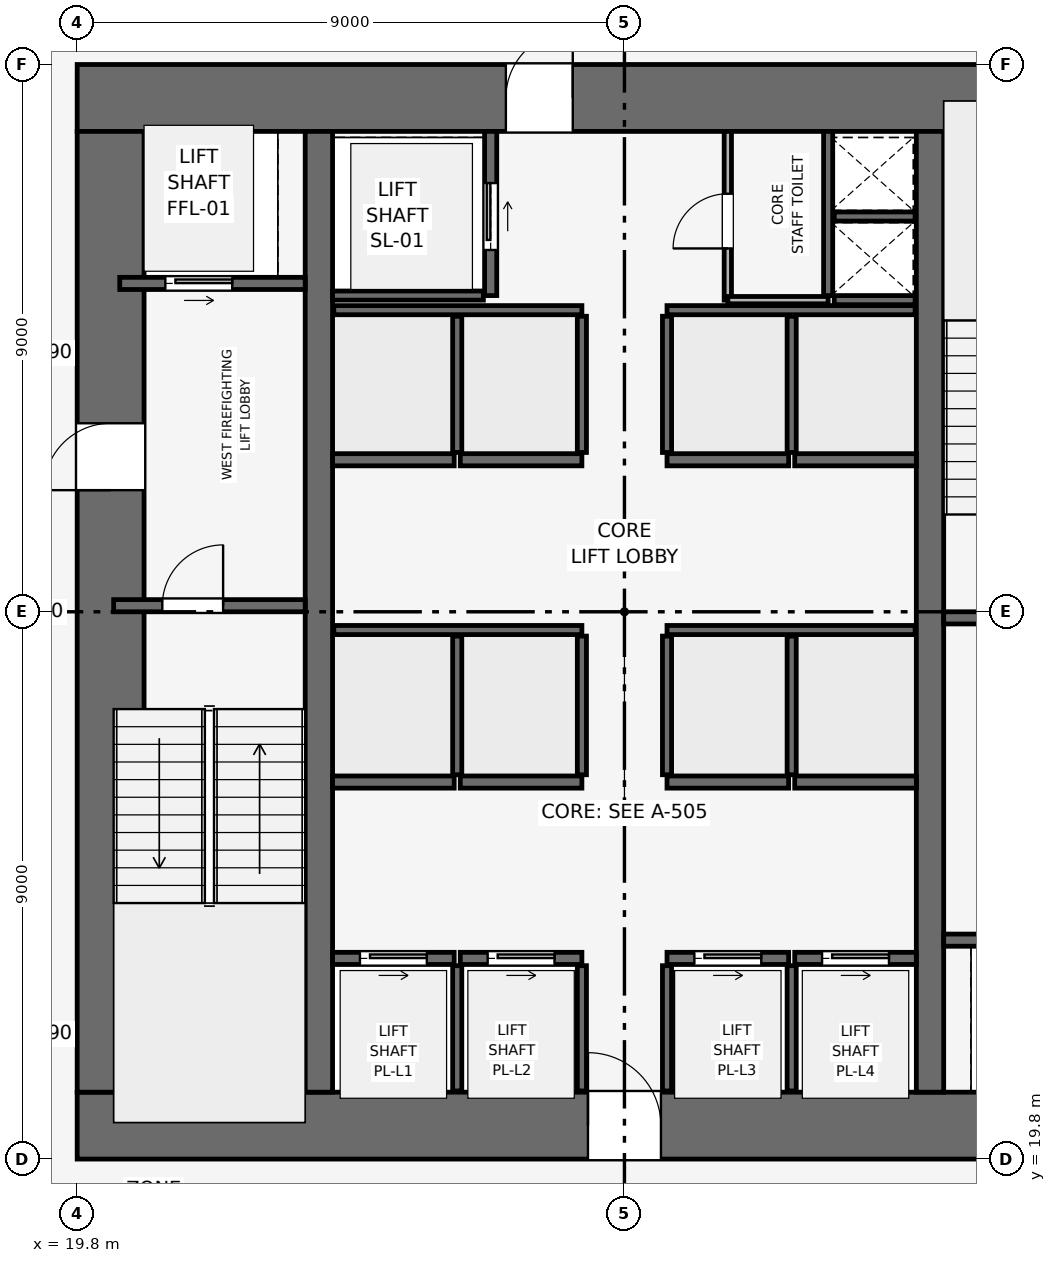
"""IFC4 building model, lengths in metres.
Left out: names, types, materials, properties, quantities, classifications, styles, units other than length and angle.
Written with IfcOpenShell. Run it as: python <this file> out.ifc"""

import sys

from ifc_helpers import new_model, si_unit, direction, frame, frame_2d, origin, place, context, subcontext, project, spatial, rectangle, extrude, element, fill, save


model = new_model("IFC4")
c1 = context("Model", 3, precision=1e-05, world=origin(), true_north=direction((0.0, 1.0)))
c2 = subcontext(c1, "Body", "Model", "MODEL_VIEW")
j1 = project(units=[si_unit("LENGTHUNIT", "METRE"), si_unit("PLANEANGLEUNIT", "RADIAN")], contexts=[c1])
p1 = place(None, origin())
s1 = spatial("IfcSite", under=j1, at=p1, CompositionType="ELEMENT")
p2 = place(p1, origin())
s2 = spatial("IfcBuilding", under=s1, at=p2, CompositionType="ELEMENT")
p3 = place(p2, frame((0.0, 0.0, 88.5)))
s3 = spatial("IfcBuildingStorey", under=s2, at=p3, CompositionType="ELEMENT", Elevation=88.5)
p4 = place(p3, frame((19.8, 20.35, 0.0), z_axis=(0.0, 0.0, 1.0), x_axis=(1.0, 0.0, 0.0)))
e1 = element("IfcWall", 1, at=p4, inside=s3, PredefinedType="SHEAR", context=c2, shape_type="SweptSolid", body=[
    extrude(rectangle(XDim=18.0, YDim=1.1, at=frame_2d((9.0, 0.0))), origin(), (0.0, 0.0, 1.0), 3.9),
])
p5 = place(p4, frame((8.4, 0.0, 0.0)))
e2 = element("IfcOpeningElement", 2, at=p5, cuts=e1, PredefinedType="OPENING", context=c2, shape_type="SweptSolid", body=[
    extrude(rectangle(XDim=1.2, YDim=2.2, at=frame_2d((0.6, 1.1))), frame((0.0, 0.56, 0.0), z_axis=(0.0, -1.0, 0.0), x_axis=(1.0, 0.0, 0.0)), (0.0, 0.0, 1.0), 1.12),
])
p6 = place(p3, frame((19.8, 37.25, 0.0), z_axis=(0.0, 0.0, 1.0), x_axis=(1.0, 0.0, 0.0)))
e3 = element("IfcWall", 3, at=p6, inside=s3, PredefinedType="SHEAR", context=c2, shape_type="SweptSolid", body=[
    extrude(rectangle(XDim=18.0, YDim=1.1, at=frame_2d((9.0, 0.0))), origin(), (0.0, 0.0, 1.0), 3.9),
])
p7 = place(p6, frame((7.05, 0.0, 0.0)))
e4 = element("IfcOpeningElement", 4, at=p7, cuts=e3, PredefinedType="OPENING", context=c2, shape_type="SweptSolid", body=[
    extrude(rectangle(XDim=1.1, YDim=2.15, at=frame_2d((0.55, 1.075))), frame((0.0, 0.56, 0.0), z_axis=(0.0, -1.0, 0.0), x_axis=(1.0, 0.0, 0.0)), (0.0, 0.0, 1.0), 1.12),
])
p8 = place(p3, frame((20.35, 20.9, 0.0), z_axis=(0.0, 0.0, 1.0), x_axis=(0.0, 1.0, 0.0)))
e5 = element("IfcWall", 5, at=p8, inside=s3, PredefinedType="SHEAR", context=c2, shape_type="SweptSolid", body=[
    extrude(rectangle(XDim=15.8, YDim=1.1, at=frame_2d((7.9, 0.0))), origin(), (0.0, 0.0, 1.0), 3.9),
])
p9 = place(p8, frame((9.9, 0.0, 0.0)))
e6 = element("IfcOpeningElement", 6, at=p9, cuts=e5, PredefinedType="OPENING", context=c2, shape_type="SweptSolid", body=[
    extrude(rectangle(XDim=1.1, YDim=2.15, at=frame_2d((0.55, 1.075))), frame((0.0, 0.56, 0.0), z_axis=(0.0, -1.0, 0.0), x_axis=(1.0, 0.0, 0.0)), (0.0, 0.0, 1.0), 1.12),
])
for number, where, z_axis, x_axis in (
    (7, (23.775, 20.9, 0.0), (0.0, 0.0, 1.0), (0.0, 1.0, 0.0)),
    (8, (33.825, 20.9, 0.0), (0.0, 0.0, 1.0), (0.0, 1.0, 0.0)),
):
    element("IfcWall", number, at=place(p3, frame(where, z_axis=z_axis, x_axis=x_axis)), inside=s3, PredefinedType="SHEAR", context=c2, shape_type="SweptSolid", body=[
        extrude(rectangle(XDim=15.8, YDim=0.45, at=frame_2d((7.9, 0.0))), origin(), (0.0, 0.0, 1.0), 3.9),
    ])
p10 = place(p3, frame((20.4, 28.9, 0.0), z_axis=(0.0, 0.0, 1.0), x_axis=(1.0, 0.0, 0.0)))
e9 = element("IfcWall", 9, at=p10, inside=s3, PredefinedType="SHEAR", context=c2, shape_type="SweptSolid", body=[
    extrude(rectangle(XDim=3.15, YDim=0.2, at=frame_2d((1.575, 0.0))), origin(), (0.0, 0.0, 1.0), 3.65),
])
p11 = place(p10, frame((0.8, 0.0, 0.0)))
e10 = element("IfcOpeningElement", 10, at=p11, cuts=e9, PredefinedType="OPENING", context=c2, shape_type="SweptSolid", body=[
    extrude(rectangle(XDim=1.0, YDim=2.1, at=frame_2d((0.5, 1.05))), frame((0.0, 0.11, 0.0), z_axis=(0.0, -1.0, 0.0), x_axis=(1.0, 0.0, 0.0)), (0.0, 0.0, 1.0), 0.22),
])
p12 = place(p3, frame((34.05, 28.7, 0.0), z_axis=(0.0, 0.0, 1.0), x_axis=(1.0, 0.0, 0.0)))
e11 = element("IfcWall", 11, at=p12, inside=s3, PredefinedType="SHEAR", context=c2, shape_type="SweptSolid", body=[
    extrude(rectangle(XDim=3.15, YDim=0.2, at=frame_2d((1.575, 0.0))), origin(), (0.0, 0.0, 1.0), 3.65),
])
p13 = place(p12, frame((0.8, 0.0, 0.0)))
e12 = element("IfcOpeningElement", 12, at=p13, cuts=e11, PredefinedType="OPENING", context=c2, shape_type="SweptSolid", body=[
    extrude(rectangle(XDim=1.0, YDim=2.1, at=frame_2d((0.5, 1.05))), frame((0.0, 0.11, 0.0), z_axis=(0.0, -1.0, 0.0), x_axis=(1.0, 0.0, 0.0)), (0.0, 0.0, 1.0), 0.22),
])
p14 = place(p3, frame((32.15, 34.0, 0.0), z_axis=(0.0, 0.0, 1.0), x_axis=(0.0, 1.0, 0.0)))
e13 = element("IfcWall", 13, at=p14, inside=s3, PredefinedType="SHEAR", context=c2, shape_type="SweptSolid", body=[
    extrude(rectangle(XDim=2.7, YDim=0.15, at=frame_2d((1.35, 0.0))), origin(), (0.0, 0.0, 1.0), 3.65),
])
for number, where, z_axis, x_axis in (
    (14, (32.25, 33.925, 0.0), (0.0, 0.0, 1.0), (1.0, 0.0, 0.0)),
    (15, (32.25, 35.3, 0.0), (0.0, 0.0, 1.0), (1.0, 0.0, 0.0)),
):
    element("IfcWall", number, at=place(p3, frame(where, z_axis=z_axis, x_axis=x_axis)), inside=s3, PredefinedType="SHEAR", context=c2, shape_type="SweptSolid", body=[
        extrude(rectangle(XDim=1.33, YDim=0.15, at=frame_2d((0.665, 0.0))), origin(), (0.0, 0.0, 1.0), 3.65),
    ])
p15 = place(p3, frame((20.5, 34.2, 0.0), z_axis=(0.0, 0.0, 1.0), x_axis=(1.0, 0.0, 0.0)))
e16 = element("IfcWall", 16, at=p15, inside=s3, PredefinedType="SHEAR", context=c2, shape_type="SweptSolid", body=[
    extrude(rectangle(XDim=3.05, YDim=0.2, at=frame_2d((1.525, 0.0))), origin(), (0.0, 0.0, 1.0), 3.65),
])
p16 = place(p15, frame((0.75, 0.0, 0.0)))
e17 = element("IfcOpeningElement", 17, at=p16, cuts=e16, PredefinedType="OPENING", context=c2, shape_type="SweptSolid", body=[
    extrude(rectangle(XDim=1.1, YDim=2.15, at=frame_2d((0.55, 1.075))), frame((0.0, 0.11, 0.0), z_axis=(0.0, -1.0, 0.0), x_axis=(1.0, 0.0, 0.0)), (0.0, 0.0, 1.0), 0.22),
])
p17 = place(p3, frame((34.05, 23.4, 0.0), z_axis=(0.0, 0.0, 1.0), x_axis=(1.0, 0.0, 0.0)))
e18 = element("IfcWall", 18, at=p17, inside=s3, PredefinedType="SHEAR", context=c2, shape_type="SweptSolid", body=[
    extrude(rectangle(XDim=3.05, YDim=0.2, at=frame_2d((1.525, 0.0))), origin(), (0.0, 0.0, 1.0), 3.65),
])
p18 = place(p17, frame((1.2, 0.0, 0.0)))
e19 = element("IfcOpeningElement", 19, at=p18, cuts=e18, PredefinedType="OPENING", context=c2, shape_type="SweptSolid", body=[
    extrude(rectangle(XDim=1.1, YDim=2.15, at=frame_2d((0.55, 1.075))), frame((0.0, 0.11, 0.0), z_axis=(0.0, -1.0, 0.0), x_axis=(1.0, 0.0, 0.0)), (0.0, 0.0, 1.0), 0.22),
])
p19 = place(p3, frame((26.6, 34.0, 0.0), z_axis=(0.0, 0.0, 1.0), x_axis=(0.0, 1.0, 0.0)))
e20 = element("IfcWall", 20, at=p19, inside=s3, PredefinedType="SHEAR", context=c2, shape_type="SweptSolid", body=[
    extrude(rectangle(XDim=2.7, YDim=0.2, at=frame_2d((1.35, 0.0))), origin(), (0.0, 0.0, 1.0), 3.65),
])
p20 = place(p19, frame((0.75, 0.0, 0.0)))
e21 = element("IfcOpeningElement", 21, at=p20, cuts=e20, PredefinedType="OPENING", context=c2, shape_type="SweptSolid", body=[
    extrude(rectangle(XDim=1.1, YDim=2.15, at=frame_2d((0.55, 1.075))), frame((0.0, 0.11, 0.0), z_axis=(0.0, -1.0, 0.0), x_axis=(1.0, 0.0, 0.0)), (0.0, 0.0, 1.0), 0.22),
])
p21 = place(p3, frame((24.0, 34.0, 0.0), z_axis=(0.0, 0.0, 1.0), x_axis=(1.0, 0.0, 0.0)))
e22 = element("IfcWall", 22, at=p21, inside=s3, PredefinedType="SHEAR", context=c2, shape_type="SweptSolid", body=[
    extrude(rectangle(XDim=2.48, YDim=0.15, at=frame_2d((1.24, 0.0))), origin(), (0.0, 0.0, 1.0), 3.65),
])
p22 = place(p3, frame((24.0, 23.1, 0.0), z_axis=(0.0, 0.0, 1.0), x_axis=(1.0, 0.0, 0.0)))
e23 = element("IfcWall", 23, at=p22, inside=s3, PredefinedType="SHEAR", context=c2, shape_type="SweptSolid", body=[
    extrude(rectangle(XDim=2.0, YDim=0.2, at=frame_2d((1.0, 0.0))), origin(), (0.0, 0.0, 1.0), 3.65),
])
p23 = place(p22, frame((0.45, 0.0, 0.0)))
e24 = element("IfcOpeningElement", 24, at=p23, cuts=e23, PredefinedType="OPENING", context=c2, shape_type="SweptSolid", body=[
    extrude(rectangle(XDim=1.1, YDim=2.15, at=frame_2d((0.55, 1.075))), frame((0.0, 0.11, 0.0), z_axis=(0.0, -1.0, 0.0), x_axis=(1.0, 0.0, 0.0)), (0.0, 0.0, 1.0), 0.22),
])
p24 = place(p3, frame((26.1, 23.1, 0.0), z_axis=(0.0, 0.0, 1.0), x_axis=(1.0, 0.0, 0.0)))
e25 = element("IfcWall", 25, at=p24, inside=s3, PredefinedType="SHEAR", context=c2, shape_type="SweptSolid", body=[
    extrude(rectangle(XDim=2.0, YDim=0.2, at=frame_2d((1.0, 0.0))), origin(), (0.0, 0.0, 1.0), 3.65),
])
p25 = place(p24, frame((0.45, 0.0, 0.0)))
e26 = element("IfcOpeningElement", 26, at=p25, cuts=e25, PredefinedType="OPENING", context=c2, shape_type="SweptSolid", body=[
    extrude(rectangle(XDim=1.1, YDim=2.15, at=frame_2d((0.55, 1.075))), frame((0.0, 0.11, 0.0), z_axis=(0.0, -1.0, 0.0), x_axis=(1.0, 0.0, 0.0)), (0.0, 0.0, 1.0), 0.22),
])
p26 = place(p3, frame((29.5, 23.1, 0.0), z_axis=(0.0, 0.0, 1.0), x_axis=(1.0, 0.0, 0.0)))
e27 = element("IfcWall", 27, at=p26, inside=s3, PredefinedType="SHEAR", context=c2, shape_type="SweptSolid", body=[
    extrude(rectangle(XDim=2.0, YDim=0.2, at=frame_2d((1.0, 0.0))), origin(), (0.0, 0.0, 1.0), 3.65),
])
p27 = place(p26, frame((0.45, 0.0, 0.0)))
e28 = element("IfcOpeningElement", 28, at=p27, cuts=e27, PredefinedType="OPENING", context=c2, shape_type="SweptSolid", body=[
    extrude(rectangle(XDim=1.1, YDim=2.15, at=frame_2d((0.55, 1.075))), frame((0.0, 0.11, 0.0), z_axis=(0.0, -1.0, 0.0), x_axis=(1.0, 0.0, 0.0)), (0.0, 0.0, 1.0), 0.22),
])
p28 = place(p3, frame((31.6, 23.1, 0.0), z_axis=(0.0, 0.0, 1.0), x_axis=(1.0, 0.0, 0.0)))
e29 = element("IfcWall", 29, at=p28, inside=s3, PredefinedType="SHEAR", context=c2, shape_type="SweptSolid", body=[
    extrude(rectangle(XDim=2.0, YDim=0.2, at=frame_2d((1.0, 0.0))), origin(), (0.0, 0.0, 1.0), 3.65),
])
p29 = place(p28, frame((0.45, 0.0, 0.0)))
e30 = element("IfcOpeningElement", 30, at=p29, cuts=e29, PredefinedType="OPENING", context=c2, shape_type="SweptSolid", body=[
    extrude(rectangle(XDim=1.1, YDim=2.15, at=frame_2d((0.55, 1.075))), frame((0.0, 0.11, 0.0), z_axis=(0.0, -1.0, 0.0), x_axis=(1.0, 0.0, 0.0)), (0.0, 0.0, 1.0), 0.22),
])
for number, where, z_axis, x_axis in (
    (31, (24.0, 26.0, 0.0), (0.0, 0.0, 1.0), (1.0, 0.0, 0.0)),
    (32, (26.1, 26.0, 0.0), (0.0, 0.0, 1.0), (1.0, 0.0, 0.0)),
    (33, (29.5, 26.0, 0.0), (0.0, 0.0, 1.0), (1.0, 0.0, 0.0)),
    (34, (31.6, 26.0, 0.0), (0.0, 0.0, 1.0), (1.0, 0.0, 0.0)),
    (35, (24.0, 31.3, 0.0), (0.0, 0.0, 1.0), (1.0, 0.0, 0.0)),
    (36, (26.1, 31.3, 0.0), (0.0, 0.0, 1.0), (1.0, 0.0, 0.0)),
    (37, (29.5, 31.3, 0.0), (0.0, 0.0, 1.0), (1.0, 0.0, 0.0)),
    (38, (31.6, 31.3, 0.0), (0.0, 0.0, 1.0), (1.0, 0.0, 0.0)),
):
    element("IfcWall", number, at=place(p3, frame(where, z_axis=z_axis, x_axis=x_axis)), inside=s3, PredefinedType="SHEAR", context=c2, shape_type="SweptSolid", body=[
        extrude(rectangle(XDim=2.0, YDim=0.2, at=frame_2d((1.0, 0.0))), origin(), (0.0, 0.0, 1.0), 3.65),
    ])
for number, where, z_axis, x_axis in (
    (39, (26.05, 20.92, 0.0), (0.0, 0.0, 1.0), (0.0, 1.0, 0.0)),
    (40, (28.1, 20.92, 0.0), (0.0, 0.0, 1.0), (0.0, 1.0, 0.0)),
    (41, (29.5, 20.92, 0.0), (0.0, 0.0, 1.0), (0.0, 1.0, 0.0)),
    (42, (31.55, 20.92, 0.0), (0.0, 0.0, 1.0), (0.0, 1.0, 0.0)),
):
    element("IfcWall", number, at=place(p3, frame(where, z_axis=z_axis, x_axis=x_axis)), inside=s3, PredefinedType="SHEAR", context=c2, shape_type="SweptSolid", body=[
        extrude(rectangle(XDim=2.06, YDim=0.15, at=frame_2d((1.03, 0.0))), origin(), (0.0, 0.0, 1.0), 3.65),
    ])
for number, where, z_axis, x_axis in (
    (43, (24.02, 28.5, 0.0), (0.0, 0.0, 1.0), (1.0, 0.0, 0.0)),
    (44, (29.5, 28.5, 0.0), (0.0, 0.0, 1.0), (1.0, 0.0, 0.0)),
):
    element("IfcWall", number, at=place(p3, frame(where, z_axis=z_axis, x_axis=x_axis)), inside=s3, PredefinedType="SHEAR", context=c2, shape_type="SweptSolid", body=[
        extrude(rectangle(XDim=4.08, YDim=0.15, at=frame_2d((2.04, 0.0))), origin(), (0.0, 0.0, 1.0), 3.65),
    ])
for number, where, z_axis, x_axis in (
    (45, (26.05, 26.12, 0.0), (0.0, 0.0, 1.0), (0.0, 1.0, 0.0)),
    (46, (28.1, 26.12, 0.0), (0.0, 0.0, 1.0), (0.0, 1.0, 0.0)),
    (47, (29.5, 26.12, 0.0), (0.0, 0.0, 1.0), (0.0, 1.0, 0.0)),
    (48, (31.55, 26.12, 0.0), (0.0, 0.0, 1.0), (0.0, 1.0, 0.0)),
):
    element("IfcWall", number, at=place(p3, frame(where, z_axis=z_axis, x_axis=x_axis)), inside=s3, PredefinedType="SHEAR", context=c2, shape_type="SweptSolid", body=[
        extrude(rectangle(XDim=2.28, YDim=0.15, at=frame_2d((1.14, 0.0))), origin(), (0.0, 0.0, 1.0), 3.65),
    ])
for number, where, z_axis, x_axis in (
    (49, (24.02, 33.76, 0.0), (0.0, 0.0, 1.0), (1.0, 0.0, 0.0)),
    (50, (29.5, 33.76, 0.0), (0.0, 0.0, 1.0), (1.0, 0.0, 0.0)),
):
    element("IfcWall", number, at=place(p3, frame(where, z_axis=z_axis, x_axis=x_axis)), inside=s3, PredefinedType="SHEAR", context=c2, shape_type="SweptSolid", body=[
        extrude(rectangle(XDim=4.08, YDim=0.15, at=frame_2d((2.04, 0.0))), origin(), (0.0, 0.0, 1.0), 3.65),
    ])
for number, where, z_axis, x_axis in (
    (51, (26.05, 31.42, 0.0), (0.0, 0.0, 1.0), (0.0, 1.0, 0.0)),
    (52, (28.1, 31.42, 0.0), (0.0, 0.0, 1.0), (0.0, 1.0, 0.0)),
    (53, (29.5, 31.42, 0.0), (0.0, 0.0, 1.0), (0.0, 1.0, 0.0)),
    (54, (31.55, 31.42, 0.0), (0.0, 0.0, 1.0), (0.0, 1.0, 0.0)),
):
    element("IfcWall", number, at=place(p3, frame(where, z_axis=z_axis, x_axis=x_axis)), inside=s3, PredefinedType="SHEAR", context=c2, shape_type="SweptSolid", body=[
        extrude(rectangle(XDim=2.24, YDim=0.15, at=frame_2d((1.12, 0.0))), origin(), (0.0, 0.0, 1.0), 3.65),
    ])
p30 = place(p3, frame((30.5, 33.925, 0.0), z_axis=(0.0, 0.0, 1.0), x_axis=(0.0, 1.0, 0.0)))
e55 = element("IfcWall", 55, at=p30, inside=s3, PredefinedType="PARTITIONING", context=c2, shape_type="SweptSolid", body=[
    extrude(rectangle(XDim=2.775, YDim=0.12, at=frame_2d((1.387, 0.0))), origin(), (0.0, 0.0, 1.0), 3.65),
])
p31 = place(p30, frame((0.85, 0.0, 0.0)))
e56 = element("IfcOpeningElement", 56, at=p31, cuts=e55, PredefinedType="OPENING", context=c2, shape_type="SweptSolid", body=[
    extrude(rectangle(XDim=0.9, YDim=2.1, at=frame_2d((0.45, 1.05))), frame((0.0, 0.07, 0.0), z_axis=(0.0, -1.0, 0.0), x_axis=(1.0, 0.0, 0.0)), (0.0, 0.0, 1.0), 0.14),
])
p32 = place(p3, frame((30.5, 33.925, 0.0), z_axis=(0.0, 0.0, 1.0), x_axis=(1.0, 0.0, 0.0)))
e57 = element("IfcWall", 57, at=p32, inside=s3, PredefinedType="PARTITIONING", context=c2, shape_type="SweptSolid", body=[
    extrude(rectangle(XDim=1.65, YDim=0.12, at=frame_2d((0.825, 0.0))), origin(), (0.0, 0.0, 1.0), 3.65),
])
p33 = place(p11, origin())
e58 = element("IfcDoor", 58, at=p33, inside=s3, OperationType="SINGLE_SWING_RIGHT", PredefinedType="DOOR", context=c2, shape_type="SweptSolid", body=[
    extrude(rectangle(XDim=1.0, YDim=2.1, at=frame_2d((0.5, 1.05))), frame((0.0, 0.025, 0.0), z_axis=(0.0, -1.0, 0.0), x_axis=(1.0, 0.0, 0.0)), (0.0, 0.0, 1.0), 0.05),
])
fill(e10, e58)
p34 = place(p16, origin())
e59 = element("IfcDoor", 59, at=p34, inside=s3, OperationType="SLIDING_TO_RIGHT", PredefinedType="DOOR", context=c2, shape_type="SweptSolid", body=[
    extrude(rectangle(XDim=1.1, YDim=2.15, at=frame_2d((0.55, 1.075))), frame((0.0, 0.025, 0.0), z_axis=(0.0, -1.0, 0.0), x_axis=(1.0, 0.0, 0.0)), (0.0, 0.0, 1.0), 0.05),
])
fill(e17, e59)
p35 = place(p20, origin())
e60 = element("IfcDoor", 60, at=p35, inside=s3, OperationType="SLIDING_TO_RIGHT", PredefinedType="DOOR", context=c2, shape_type="SweptSolid", body=[
    extrude(rectangle(XDim=1.1, YDim=2.15, at=frame_2d((0.55, 1.075))), frame((0.0, 0.025, 0.0), z_axis=(0.0, -1.0, 0.0), x_axis=(1.0, 0.0, 0.0)), (0.0, 0.0, 1.0), 0.05),
])
fill(e21, e60)
p36 = place(p23, origin())
e61 = element("IfcDoor", 61, at=p36, inside=s3, OperationType="SLIDING_TO_RIGHT", PredefinedType="DOOR", context=c2, shape_type="SweptSolid", body=[
    extrude(rectangle(XDim=1.1, YDim=2.15, at=frame_2d((0.55, 1.075))), frame((0.0, 0.025, 0.0), z_axis=(0.0, -1.0, 0.0), x_axis=(1.0, 0.0, 0.0)), (0.0, 0.0, 1.0), 0.05),
])
fill(e24, e61)
p37 = place(p25, origin())
e62 = element("IfcDoor", 62, at=p37, inside=s3, OperationType="SLIDING_TO_RIGHT", PredefinedType="DOOR", context=c2, shape_type="SweptSolid", body=[
    extrude(rectangle(XDim=1.1, YDim=2.15, at=frame_2d((0.55, 1.075))), frame((0.0, 0.025, 0.0), z_axis=(0.0, -1.0, 0.0), x_axis=(1.0, 0.0, 0.0)), (0.0, 0.0, 1.0), 0.05),
])
fill(e26, e62)
p38 = place(p27, origin())
e63 = element("IfcDoor", 63, at=p38, inside=s3, OperationType="SLIDING_TO_RIGHT", PredefinedType="DOOR", context=c2, shape_type="SweptSolid", body=[
    extrude(rectangle(XDim=1.1, YDim=2.15, at=frame_2d((0.55, 1.075))), frame((0.0, 0.025, 0.0), z_axis=(0.0, -1.0, 0.0), x_axis=(1.0, 0.0, 0.0)), (0.0, 0.0, 1.0), 0.05),
])
fill(e28, e63)
p39 = place(p29, origin())
e64 = element("IfcDoor", 64, at=p39, inside=s3, OperationType="SLIDING_TO_RIGHT", PredefinedType="DOOR", context=c2, shape_type="SweptSolid", body=[
    extrude(rectangle(XDim=1.1, YDim=2.15, at=frame_2d((0.55, 1.075))), frame((0.0, 0.025, 0.0), z_axis=(0.0, -1.0, 0.0), x_axis=(1.0, 0.0, 0.0)), (0.0, 0.0, 1.0), 0.05),
])
fill(e30, e64)
p40 = place(p31, origin())
e65 = element("IfcDoor", 65, at=p40, inside=s3, OperationType="SINGLE_SWING_LEFT", PredefinedType="DOOR", context=c2, shape_type="SweptSolid", body=[
    extrude(rectangle(XDim=0.9, YDim=2.1, at=frame_2d((0.45, 1.05))), frame((0.0, 0.025, 0.0), z_axis=(0.0, -1.0, 0.0), x_axis=(1.0, 0.0, 0.0)), (0.0, 0.0, 1.0), 0.05),
])
fill(e56, e65)
p41 = place(p9, origin())
e66 = element("IfcDoor", 66, at=p41, inside=s3, OperationType="SINGLE_SWING_LEFT", PredefinedType="DOOR", context=c2, shape_type="SweptSolid", body=[
    extrude(rectangle(XDim=1.1, YDim=2.15, at=frame_2d((0.55, 1.075))), frame((0.0, 0.025, 0.0), z_axis=(0.0, -1.0, 0.0), x_axis=(1.0, 0.0, 0.0)), (0.0, 0.0, 1.0), 0.05),
])
fill(e6, e66)
p42 = place(p5, origin())
e67 = element("IfcDoor", 67, at=p42, inside=s3, OperationType="SINGLE_SWING_LEFT", PredefinedType="DOOR", context=c2, shape_type="SweptSolid", body=[
    extrude(rectangle(XDim=1.2, YDim=2.2, at=frame_2d((0.6, 1.1))), frame((0.0, 0.025, 0.0), z_axis=(0.0, -1.0, 0.0), x_axis=(1.0, 0.0, 0.0)), (0.0, 0.0, 1.0), 0.05),
])
fill(e2, e67)
p43 = place(p7, origin())
e68 = element("IfcDoor", 68, at=p43, inside=s3, OperationType="SINGLE_SWING_RIGHT", PredefinedType="DOOR", context=c2, shape_type="SweptSolid", body=[
    extrude(rectangle(XDim=1.1, YDim=2.15, at=frame_2d((0.55, 1.075))), frame((0.0, 0.025, 0.0), z_axis=(0.0, -1.0, 0.0), x_axis=(1.0, 0.0, 0.0)), (0.0, 0.0, 1.0), 0.05),
])
fill(e4, e68)
save(model, sys.argv[1])
